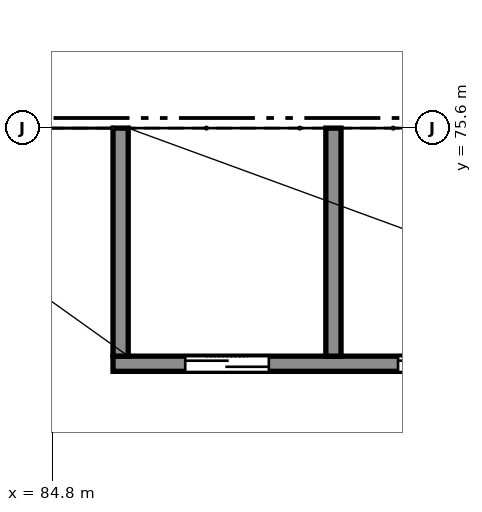
"""IFC4 building model, lengths in metres.
Left out: names, types, materials, properties, quantities, classifications, styles, units other than length and angle.
Written with IfcOpenShell. Run it as: python <this file> out.ifc"""

import sys

from ifc_helpers import new_model, si_unit, direction, frame, frame_2d, origin, place, context, subcontext, project, spatial, rectangle, extrude, element, fill, save


model = new_model("IFC4")
c1 = context("Model", 3, precision=1e-05, world=origin(), true_north=direction((0.0, 1.0)))
c2 = subcontext(c1, "Body", "Model", "MODEL_VIEW")
j1 = project(units=[si_unit("LENGTHUNIT", "METRE"), si_unit("PLANEANGLEUNIT", "RADIAN")], contexts=[c1])
p1 = place(None, origin())
s1 = spatial("IfcSite", under=j1, at=p1, CompositionType="ELEMENT")
p2 = place(p1, origin())
s2 = spatial("IfcBuilding", under=s1, at=p2, CompositionType="ELEMENT")
p3 = place(p2, frame((0.0, 0.0, 10.5)))
s3 = spatial("IfcBuildingStorey", under=s2, at=p3, CompositionType="ELEMENT", Elevation=10.5)
p4 = place(p3, frame((85.6, 72.5, 0.0), z_axis=(0.0, 0.0, 1.0), x_axis=(1.0, 0.0, 0.0)))
e1 = element("IfcWall", 1, at=p4, inside=s3, PredefinedType="SHEAR", context=c2, shape_type="SweptSolid", body=[
    extrude(rectangle(XDim=8.6, YDim=0.2, at=frame_2d((4.3, 0.0))), origin(), (0.0, 0.0, 1.0), 9.5),
])
p5 = place(p4, frame((0.95, 0.0, 0.0)))
e2 = element("IfcOpeningElement", 2, at=p5, cuts=e1, PredefinedType="OPENING", context=c2, shape_type="SweptSolid", body=[
    extrude(rectangle(XDim=1.1, YDim=2.1, at=frame_2d((0.55, 1.05))), frame((0.0, 0.11, 0.0), z_axis=(0.0, -1.0, 0.0), x_axis=(1.0, 0.0, 0.0)), (0.0, 0.0, 1.0), 0.22),
])
p6 = place(p4, frame((3.75, 0.0, 0.0)))
e3 = element("IfcOpeningElement", 3, at=p6, cuts=e1, PredefinedType="OPENING", context=c2, shape_type="SweptSolid", body=[
    extrude(rectangle(XDim=1.1, YDim=2.1, at=frame_2d((0.55, 1.05))), frame((0.0, 0.11, 0.0), z_axis=(0.0, -1.0, 0.0), x_axis=(1.0, 0.0, 0.0)), (0.0, 0.0, 1.0), 0.22),
])
p7 = place(p4, frame((6.55, 0.0, 0.0)))
e4 = element("IfcOpeningElement", 4, at=p7, cuts=e1, PredefinedType="OPENING", context=c2, shape_type="SweptSolid", body=[
    extrude(rectangle(XDim=1.1, YDim=2.1, at=frame_2d((0.55, 1.05))), frame((0.0, 0.11, 0.0), z_axis=(0.0, -1.0, 0.0), x_axis=(1.0, 0.0, 0.0)), (0.0, 0.0, 1.0), 0.22),
])
for number, where, z_axis, x_axis in (
    (5, (85.7, 72.6, 0.0), (0.0, 0.0, 1.0), (0.0, 1.0, 0.0)),
    (6, (88.5, 72.6, 0.0), (0.0, 0.0, 1.0), (0.0, 1.0, 0.0)),
):
    element("IfcWall", number, at=place(p3, frame(where, z_axis=z_axis, x_axis=x_axis)), inside=s3, PredefinedType="SHEAR", context=c2, shape_type="SweptSolid", body=[
        extrude(rectangle(XDim=3.0, YDim=0.2, at=frame_2d((1.5, 0.0))), origin(), (0.0, 0.0, 1.0), 9.5),
    ])
p8 = place(p5, origin())
e7 = element("IfcDoor", 7, at=p8, inside=s3, OperationType="DOUBLE_DOOR_SLIDING", PredefinedType="DOOR", context=c2, shape_type="SweptSolid", body=[
    extrude(rectangle(XDim=1.1, YDim=2.1, at=frame_2d((0.55, 1.05))), frame((0.0, 0.025, 0.0), z_axis=(0.0, -1.0, 0.0), x_axis=(1.0, 0.0, 0.0)), (0.0, 0.0, 1.0), 0.05),
])
fill(e2, e7)
p9 = place(p6, origin())
e8 = element("IfcDoor", 8, at=p9, inside=s3, OperationType="DOUBLE_DOOR_SLIDING", PredefinedType="DOOR", context=c2, shape_type="SweptSolid", body=[
    extrude(rectangle(XDim=1.1, YDim=2.1, at=frame_2d((0.55, 1.05))), frame((0.0, 0.025, 0.0), z_axis=(0.0, -1.0, 0.0), x_axis=(1.0, 0.0, 0.0)), (0.0, 0.0, 1.0), 0.05),
])
fill(e3, e8)
save(model, sys.argv[1])
